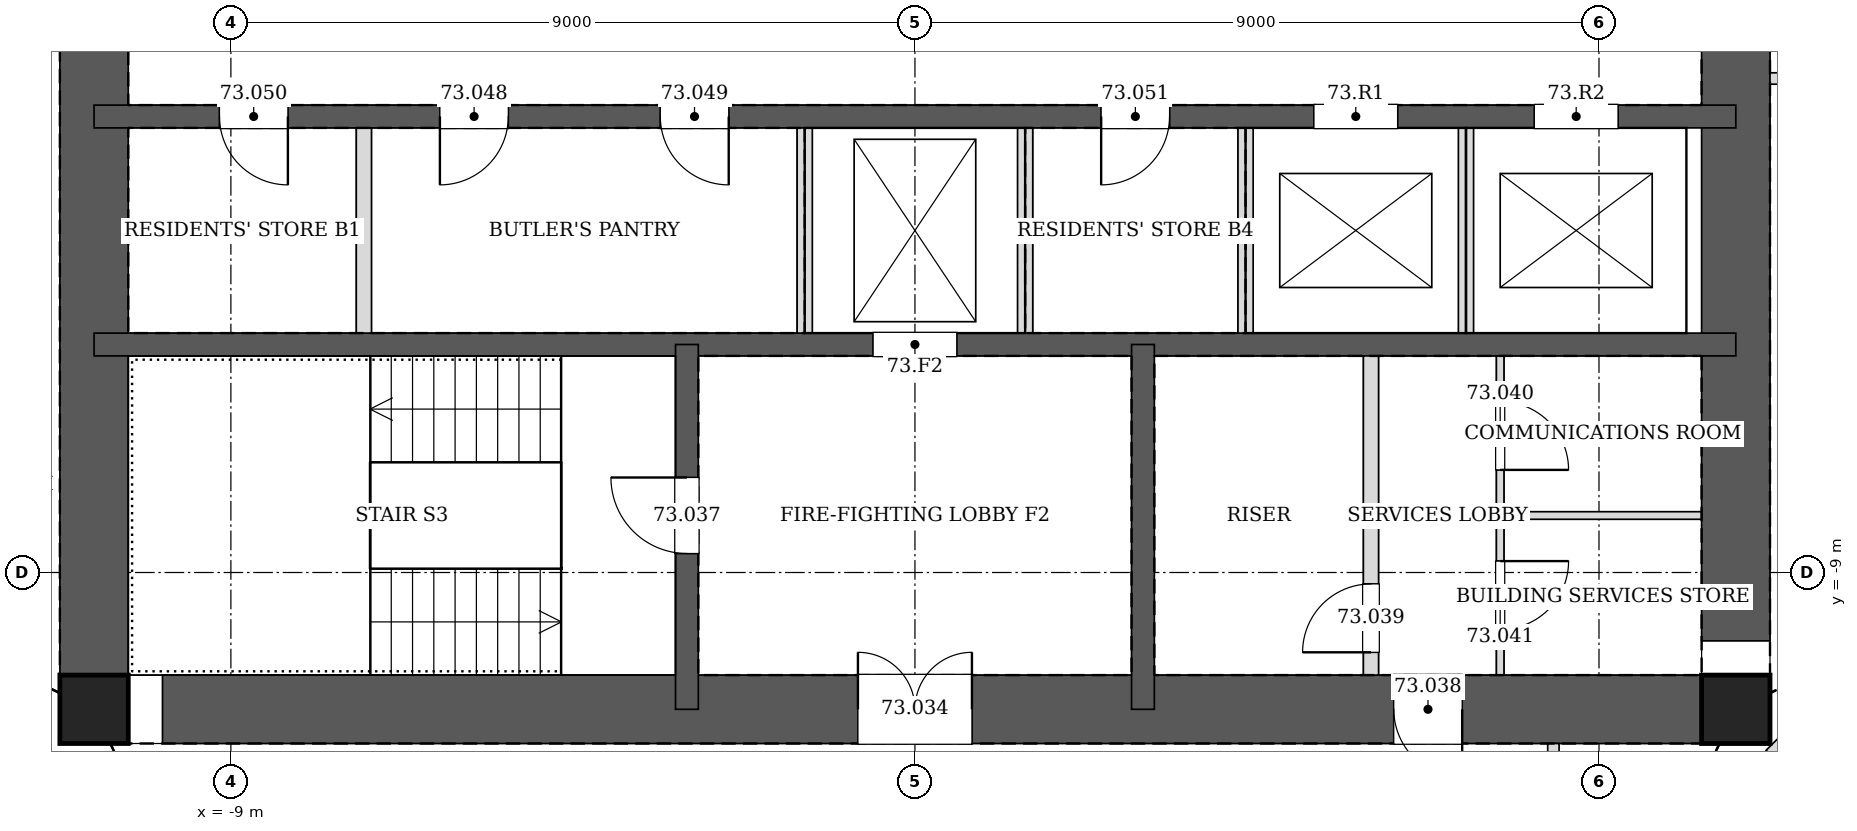
"""IFC4 building model, lengths in metres.
Left out: names, types, materials, properties, quantities, classifications, styles, units other than length and angle.
Written with IfcOpenShell. Run it as: python <this file> out.ifc"""

import sys

from ifc_helpers import new_model, si_unit, direction, frame, frame_2d, origin, origin_2d, place, context, subcontext, project, spatial, rectangle, hollow_rectangle, extrude, element, fill, save


model = new_model("IFC4")
c1 = context("Model", 3, precision=1e-05, world=origin(), true_north=direction((0.0, 1.0)))
c2 = subcontext(c1, "Body", "Model", "MODEL_VIEW")
j1 = project(units=[si_unit("LENGTHUNIT", "METRE"), si_unit("PLANEANGLEUNIT", "RADIAN")], contexts=[c1])
p1 = place(None, origin())
s1 = spatial("IfcSite", under=j1, at=p1, CompositionType="ELEMENT")
p2 = place(p1, origin())
s2 = spatial("IfcBuilding", under=s1, at=p2, CompositionType="ELEMENT")
p3 = place(p2, frame((0.0, 0.0, 298.0)))
s3 = spatial("IfcBuildingStorey", under=s2, at=p3, CompositionType="ELEMENT", Elevation=298.0)
for number, where, z_axis, x_axis in (
    (1, (-10.8, -10.8, 0.0), (0.0, 0.0, 1.0), (1.0, 0.0, 0.0)),
    (2, (10.8, -10.8, 0.0), (0.0, 0.0, 1.0), (1.0, 0.0, 0.0)),
):
    element("IfcColumn", number, at=place(p3, frame(where, z_axis=z_axis, x_axis=x_axis)), inside=s3, PredefinedType="COLUMN", context=c2, shape_type="SweptSolid", body=[
        extrude(hollow_rectangle(XDim=0.9, YDim=0.9, WallThickness=0.04, at=origin_2d()), origin(), (0.0, 0.0, 1.0), 3.4),
    ])
p4 = place(p3, frame((-10.8, -10.8, 0.0), z_axis=(0.0, 0.0, 1.0), x_axis=(1.0, 0.0, 0.0)))
e3 = element("IfcWall", 3, at=p4, inside=s3, PredefinedType="SOLIDWALL", context=c2, shape_type="SweptSolid", body=[
    extrude(rectangle(XDim=21.6, YDim=0.9, at=frame_2d((10.8, 0.0))), origin(), (0.0, 0.0, 1.0), 3.4),
])
p5 = place(p4, frame((10.05, 0.0, 0.0)))
e4 = element("IfcOpeningElement", 4, at=p5, cuts=e3, PredefinedType="OPENING", context=c2, shape_type="SweptSolid", body=[
    extrude(rectangle(XDim=1.5, YDim=2.1, at=frame_2d((0.75, 1.05))), frame((0.0, 0.46, 0.0), z_axis=(0.0, -1.0, 0.0), x_axis=(1.0, 0.0, 0.0)), (0.0, 0.0, 1.0), 0.92),
])
p6 = place(p4, frame((17.1, 0.0, 0.0)))
e5 = element("IfcOpeningElement", 5, at=p6, cuts=e3, PredefinedType="OPENING", context=c2, shape_type="SweptSolid", body=[
    extrude(rectangle(XDim=0.9, YDim=2.1, at=frame_2d((0.45, 1.05))), frame((0.0, 0.46, 0.0), z_axis=(0.0, -1.0, 0.0), x_axis=(1.0, 0.0, 0.0)), (0.0, 0.0, 1.0), 0.92),
])
p7 = place(p3, frame((10.8, -10.8, 0.0), z_axis=(0.0, 0.0, 1.0), x_axis=(0.0, 1.0, 0.0)))
e6 = element("IfcWall", 6, at=p7, inside=s3, PredefinedType="SOLIDWALL", context=c2, shape_type="SweptSolid", body=[
    extrude(rectangle(XDim=21.6, YDim=0.9, at=frame_2d((10.8, 0.0))), origin(), (0.0, 0.0, 1.0), 3.4),
])
p8 = place(p7, frame((11.7, 0.0, 0.0)))
e7 = element("IfcOpeningElement", 7, at=p8, cuts=e6, PredefinedType="OPENING", context=c2, shape_type="SweptSolid", body=[
    extrude(rectangle(XDim=1.2, YDim=2.1, at=frame_2d((0.6, 1.05))), frame((0.0, 0.46, 0.0), z_axis=(0.0, -1.0, 0.0), x_axis=(1.0, 0.0, 0.0)), (0.0, 0.0, 1.0), 0.92),
])
p9 = place(p7, frame((8.7, 0.0, 0.0)))
e8 = element("IfcOpeningElement", 8, at=p9, cuts=e6, PredefinedType="OPENING", context=c2, shape_type="SweptSolid", body=[
    extrude(rectangle(XDim=1.2, YDim=2.1, at=frame_2d((0.6, 1.05))), frame((0.0, 0.46, 0.0), z_axis=(0.0, -1.0, 0.0), x_axis=(1.0, 0.0, 0.0)), (0.0, 0.0, 1.0), 0.92),
])
p10 = place(p3, frame((-10.8, 10.8, 0.0), z_axis=(0.0, 0.0, 1.0), x_axis=(0.0, -1.0, 0.0)))
e9 = element("IfcWall", 9, at=p10, inside=s3, PredefinedType="SOLIDWALL", context=c2, shape_type="SweptSolid", body=[
    extrude(rectangle(XDim=21.6, YDim=0.9, at=frame_2d((10.8, 0.0))), origin(), (0.0, 0.0, 1.0), 3.4),
])
p11 = place(p10, frame((8.7, 0.0, 0.0)))
e10 = element("IfcOpeningElement", 10, at=p11, cuts=e9, PredefinedType="OPENING", context=c2, shape_type="SweptSolid", body=[
    extrude(rectangle(XDim=1.2, YDim=2.1, at=frame_2d((0.6, 1.05))), frame((0.0, 0.46, 0.0), z_axis=(0.0, -1.0, 0.0), x_axis=(1.0, 0.0, 0.0)), (0.0, 0.0, 1.0), 0.92),
])
p12 = place(p10, frame((11.7, 0.0, 0.0)))
e11 = element("IfcOpeningElement", 11, at=p12, cuts=e9, PredefinedType="OPENING", context=c2, shape_type="SweptSolid", body=[
    extrude(rectangle(XDim=1.2, YDim=2.1, at=frame_2d((0.6, 1.05))), frame((0.0, 0.46, 0.0), z_axis=(0.0, -1.0, 0.0), x_axis=(1.0, 0.0, 0.0)), (0.0, 0.0, 1.0), 0.92),
])
p13 = place(p3, frame((-10.8, -3.0, 0.0), z_axis=(0.0, 0.0, 1.0), x_axis=(1.0, 0.0, 0.0)))
e12 = element("IfcWall", 12, at=p13, inside=s3, PredefinedType="SOLIDWALL", context=c2, shape_type="SweptSolid", body=[
    extrude(rectangle(XDim=21.6, YDim=0.3, at=frame_2d((10.8, 0.0))), origin(), (0.0, 0.0, 1.0), 3.4),
])
p14 = place(p13, frame((4.55, 0.0, 0.0)))
e13 = element("IfcOpeningElement", 13, at=p14, cuts=e12, PredefinedType="OPENING", context=c2, shape_type="SweptSolid", body=[
    extrude(rectangle(XDim=0.9, YDim=2.1, at=frame_2d((0.45, 1.05))), frame((0.0, 0.16, 0.0), z_axis=(0.0, -1.0, 0.0), x_axis=(1.0, 0.0, 0.0)), (0.0, 0.0, 1.0), 0.32),
])
p15 = place(p13, frame((7.45, 0.0, 0.0)))
e14 = element("IfcOpeningElement", 14, at=p15, cuts=e12, PredefinedType="OPENING", context=c2, shape_type="SweptSolid", body=[
    extrude(rectangle(XDim=0.9, YDim=2.1, at=frame_2d((0.45, 1.05))), frame((0.0, 0.16, 0.0), z_axis=(0.0, -1.0, 0.0), x_axis=(1.0, 0.0, 0.0)), (0.0, 0.0, 1.0), 0.32),
])
p16 = place(p13, frame((1.65, 0.0, 0.0)))
e15 = element("IfcOpeningElement", 15, at=p16, cuts=e12, PredefinedType="OPENING", context=c2, shape_type="SweptSolid", body=[
    extrude(rectangle(XDim=0.9, YDim=2.1, at=frame_2d((0.45, 1.05))), frame((0.0, 0.16, 0.0), z_axis=(0.0, -1.0, 0.0), x_axis=(1.0, 0.0, 0.0)), (0.0, 0.0, 1.0), 0.32),
])
p17 = place(p13, frame((13.25, 0.0, 0.0)))
e16 = element("IfcOpeningElement", 16, at=p17, cuts=e12, PredefinedType="OPENING", context=c2, shape_type="SweptSolid", body=[
    extrude(rectangle(XDim=0.9, YDim=2.1, at=frame_2d((0.45, 1.05))), frame((0.0, 0.16, 0.0), z_axis=(0.0, -1.0, 0.0), x_axis=(1.0, 0.0, 0.0)), (0.0, 0.0, 1.0), 0.32),
])
p18 = place(p13, frame((16.05, 0.0, 0.0)))
e17 = element("IfcOpeningElement", 17, at=p18, cuts=e12, PredefinedType="OPENING", context=c2, shape_type="SweptSolid", body=[
    extrude(rectangle(XDim=1.1, YDim=2.1, at=frame_2d((0.55, 1.05))), frame((0.0, 0.16, 0.0), z_axis=(0.0, -1.0, 0.0), x_axis=(1.0, 0.0, 0.0)), (0.0, 0.0, 1.0), 0.32),
])
p19 = place(p13, frame((18.95, 0.0, 0.0)))
e18 = element("IfcOpeningElement", 18, at=p19, cuts=e12, PredefinedType="OPENING", context=c2, shape_type="SweptSolid", body=[
    extrude(rectangle(XDim=1.1, YDim=2.1, at=frame_2d((0.55, 1.05))), frame((0.0, 0.16, 0.0), z_axis=(0.0, -1.0, 0.0), x_axis=(1.0, 0.0, 0.0)), (0.0, 0.0, 1.0), 0.32),
])
p20 = place(p3, frame((-10.8, -6.0, 0.0), z_axis=(0.0, 0.0, 1.0), x_axis=(1.0, 0.0, 0.0)))
e19 = element("IfcWall", 19, at=p20, inside=s3, PredefinedType="SOLIDWALL", context=c2, shape_type="SweptSolid", body=[
    extrude(rectangle(XDim=21.6, YDim=0.3, at=frame_2d((10.8, 0.0))), origin(), (0.0, 0.0, 1.0), 3.4),
])
p21 = place(p20, frame((10.25, 0.0, 0.0)))
e20 = element("IfcOpeningElement", 20, at=p21, cuts=e19, PredefinedType="OPENING", context=c2, shape_type="SweptSolid", body=[
    extrude(rectangle(XDim=1.1, YDim=2.1, at=frame_2d((0.55, 1.05))), frame((0.0, 0.16, 0.0), z_axis=(0.0, -1.0, 0.0), x_axis=(1.0, 0.0, 0.0)), (0.0, 0.0, 1.0), 0.32),
])
p22 = place(p3, frame((-3.0, -6.0, 0.0), z_axis=(0.0, 0.0, 1.0), x_axis=(0.0, -1.0, 0.0)))
e21 = element("IfcWall", 21, at=p22, inside=s3, PredefinedType="SOLIDWALL", context=c2, shape_type="SweptSolid", body=[
    extrude(rectangle(XDim=4.8, YDim=0.3, at=frame_2d((2.4, 0.0))), origin(), (0.0, 0.0, 1.0), 3.4),
])
p23 = place(p22, frame((1.75, 0.0, 0.0)))
e22 = element("IfcOpeningElement", 22, at=p23, cuts=e21, PredefinedType="OPENING", context=c2, shape_type="SweptSolid", body=[
    extrude(rectangle(XDim=1.0, YDim=2.1, at=frame_2d((0.5, 1.05))), frame((0.0, 0.16, 0.0), z_axis=(0.0, -1.0, 0.0), x_axis=(1.0, 0.0, 0.0)), (0.0, 0.0, 1.0), 0.32),
])
p24 = place(p3, frame((3.0, -6.0, 0.0), z_axis=(0.0, 0.0, 1.0), x_axis=(0.0, -1.0, 0.0)))
e23 = element("IfcWall", 23, at=p24, inside=s3, PredefinedType="SOLIDWALL", context=c2, shape_type="SweptSolid", body=[
    extrude(rectangle(XDim=4.8, YDim=0.3, at=frame_2d((2.4, 0.0))), origin(), (0.0, 0.0, 1.0), 3.4),
])
for number, where, z_axis, x_axis in (
    (24, (11.25, -2.5, 0.0), (0.0, 0.0, 1.0), (1.0, 0.0, 0.0)),
    (25, (8.4, -12.9, 0.0), (0.0, 0.0, 1.0), (0.0, 1.0, 0.0)),
):
    element("IfcWall", number, at=place(p3, frame(where, z_axis=z_axis, x_axis=x_axis)), inside=s3, PredefinedType="PARTITIONING", context=c2, shape_type="SweptSolid", body=[
        extrude(rectangle(XDim=1.65, YDim=0.15, at=frame_2d((0.825, 0.0))), origin(), (0.0, 0.0, 1.0), 3.2),
    ])
p25 = place(p3, frame((11.269, -11.269, 0.0), z_axis=(0.0, 0.0, 1.0), x_axis=(0.707106781187, -0.707106781187, 0.0)))
e26 = element("IfcWall", 26, at=p25, inside=s3, PredefinedType="PARTITIONING", context=c2, shape_type="SweptSolid", body=[
    extrude(rectangle(XDim=2.508, YDim=0.2, at=frame_2d((1.254, 0.0))), origin(), (0.0, 0.0, 1.0), 2.591),
])
for number, where, z_axis, x_axis in (
    (27, (-7.25, -5.85, 0.0), (0.0, 0.0, 1.0), (0.0, 1.0, 0.0)),
    (28, (-1.45, -5.85, 0.0), (0.0, 0.0, 1.0), (0.0, 1.0, 0.0)),
    (29, (1.45, -5.85, 0.0), (0.0, 0.0, 1.0), (0.0, 1.0, 0.0)),
    (30, (4.35, -5.85, 0.0), (0.0, 0.0, 1.0), (0.0, 1.0, 0.0)),
):
    element("IfcWall", number, at=place(p3, frame(where, z_axis=z_axis, x_axis=x_axis)), inside=s3, PredefinedType="PARTITIONING", context=c2, shape_type="SweptSolid", body=[
        extrude(rectangle(XDim=2.7, YDim=0.2, at=frame_2d((1.35, 0.0))), origin(), (0.0, 0.0, 1.0), 3.2),
    ])
p26 = place(p3, frame((7.25, -5.85, 0.0), z_axis=(0.0, 0.0, 1.0), x_axis=(0.0, 1.0, 0.0)))
e31 = element("IfcWall", 31, at=p26, inside=s3, PredefinedType="PARTITIONING", context=c2, shape_type="SweptSolid", body=[
    extrude(rectangle(XDim=2.7, YDim=0.2, at=frame_2d((1.35, 0.0))), origin(), (0.0, 0.0, 1.0), 3.4),
])
p27 = place(p3, frame((6.0, -10.35, 0.0), z_axis=(0.0, 0.0, 1.0), x_axis=(0.0, 1.0, 0.0)))
e32 = element("IfcWall", 32, at=p27, inside=s3, PredefinedType="PARTITIONING", context=c2, shape_type="SweptSolid", body=[
    extrude(rectangle(XDim=4.2, YDim=0.2, at=frame_2d((2.1, 0.0))), origin(), (0.0, 0.0, 1.0), 3.2),
])
p28 = place(p27, frame((0.3, 0.0, 0.0)))
e33 = element("IfcOpeningElement", 33, at=p28, cuts=e32, PredefinedType="OPENING", context=c2, shape_type="SweptSolid", body=[
    extrude(rectangle(XDim=0.9, YDim=2.1, at=frame_2d((0.45, 1.05))), frame((0.0, 0.11, 0.0), z_axis=(0.0, -1.0, 0.0), x_axis=(1.0, 0.0, 0.0)), (0.0, 0.0, 1.0), 0.22),
])
p29 = place(p3, frame((7.7, -10.35, 0.0), z_axis=(0.0, 0.0, 1.0), x_axis=(0.0, 1.0, 0.0)))
e34 = element("IfcWall", 34, at=p29, inside=s3, PredefinedType="PARTITIONING", context=c2, shape_type="SweptSolid", body=[
    extrude(rectangle(XDim=4.2, YDim=0.1, at=frame_2d((2.1, 0.0))), origin(), (0.0, 0.0, 1.0), 3.2),
])
p30 = place(p29, frame((2.7, 0.0, 0.0)))
e35 = element("IfcOpeningElement", 35, at=p30, cuts=e34, PredefinedType="OPENING", context=c2, shape_type="SweptSolid", body=[
    extrude(rectangle(XDim=0.9, YDim=2.1, at=frame_2d((0.45, 1.05))), frame((0.0, 0.06, 0.0), z_axis=(0.0, -1.0, 0.0), x_axis=(1.0, 0.0, 0.0)), (0.0, 0.0, 1.0), 0.12),
])
p31 = place(p29, frame((0.6, 0.0, 0.0)))
e36 = element("IfcOpeningElement", 36, at=p31, cuts=e34, PredefinedType="OPENING", context=c2, shape_type="SweptSolid", body=[
    extrude(rectangle(XDim=0.9, YDim=2.1, at=frame_2d((0.45, 1.05))), frame((0.0, 0.06, 0.0), z_axis=(0.0, -1.0, 0.0), x_axis=(1.0, 0.0, 0.0)), (0.0, 0.0, 1.0), 0.12),
])
p32 = place(p3, frame((7.7, -8.25, 0.0), z_axis=(0.0, 0.0, 1.0), x_axis=(1.0, 0.0, 0.0)))
e37 = element("IfcWall", 37, at=p32, inside=s3, PredefinedType="PARTITIONING", context=c2, shape_type="SweptSolid", body=[
    extrude(rectangle(XDim=2.65, YDim=0.1, at=frame_2d((1.325, 0.0))), origin(), (0.0, 0.0, 1.0), 3.2),
])
p33 = place(p5, origin())
e38 = element("IfcDoor", 38, at=p33, inside=s3, OperationType="DOUBLE_DOOR_SINGLE_SWING", PredefinedType="DOOR", context=c2, shape_type="SweptSolid", body=[
    extrude(rectangle(XDim=1.5, YDim=2.1, at=frame_2d((0.75, 1.05))), frame((0.0, 0.025, 0.0), z_axis=(0.0, -1.0, 0.0), x_axis=(1.0, 0.0, 0.0)), (0.0, 0.0, 1.0), 0.05),
])
fill(e4, e38)
p34 = place(p23, frame((1.0, 0.0, 0.0), z_axis=(0.0, 0.0, 1.0), x_axis=(-1.0, 0.0, 0.0)))
e39 = element("IfcDoor", 39, at=p34, inside=s3, OperationType="SINGLE_SWING_RIGHT", PredefinedType="DOOR", context=c2, shape_type="SweptSolid", body=[
    extrude(rectangle(XDim=1.0, YDim=2.1, at=frame_2d((0.5, 1.05))), frame((0.0, 0.025, 0.0), z_axis=(0.0, -1.0, 0.0), x_axis=(1.0, 0.0, 0.0)), (0.0, 0.0, 1.0), 0.05),
])
fill(e22, e39)
p35 = place(p6, frame((0.9, 0.0, 0.0), z_axis=(0.0, 0.0, 1.0), x_axis=(-1.0, 0.0, 0.0)))
e40 = element("IfcDoor", 40, at=p35, inside=s3, OperationType="SINGLE_SWING_LEFT", PredefinedType="DOOR", context=c2, shape_type="SweptSolid", body=[
    extrude(rectangle(XDim=0.9, YDim=2.1, at=frame_2d((0.45, 1.05))), frame((0.0, 0.025, 0.0), z_axis=(0.0, -1.0, 0.0), x_axis=(1.0, 0.0, 0.0)), (0.0, 0.0, 1.0), 0.05),
])
fill(e5, e40)
p36 = place(p28, origin())
e41 = element("IfcDoor", 41, at=p36, inside=s3, OperationType="SINGLE_SWING_LEFT", PredefinedType="DOOR", context=c2, shape_type="SweptSolid", body=[
    extrude(rectangle(XDim=0.9, YDim=2.1, at=frame_2d((0.45, 1.05))), frame((0.0, 0.025, 0.0), z_axis=(0.0, -1.0, 0.0), x_axis=(1.0, 0.0, 0.0)), (0.0, 0.0, 1.0), 0.05),
])
fill(e33, e41)
p37 = place(p30, frame((0.9, 0.0, 0.0), z_axis=(0.0, 0.0, 1.0), x_axis=(-1.0, 0.0, 0.0)))
e42 = element("IfcDoor", 42, at=p37, inside=s3, OperationType="SINGLE_SWING_RIGHT", PredefinedType="DOOR", context=c2, shape_type="SweptSolid", body=[
    extrude(rectangle(XDim=0.9, YDim=2.1, at=frame_2d((0.45, 1.05))), frame((0.0, 0.025, 0.0), z_axis=(0.0, -1.0, 0.0), x_axis=(1.0, 0.0, 0.0)), (0.0, 0.0, 1.0), 0.05),
])
fill(e35, e42)
p38 = place(p31, frame((0.9, 0.0, 0.0), z_axis=(0.0, 0.0, 1.0), x_axis=(-1.0, 0.0, 0.0)))
e43 = element("IfcDoor", 43, at=p38, inside=s3, OperationType="SINGLE_SWING_LEFT", PredefinedType="DOOR", context=c2, shape_type="SweptSolid", body=[
    extrude(rectangle(XDim=0.9, YDim=2.1, at=frame_2d((0.45, 1.05))), frame((0.0, 0.025, 0.0), z_axis=(0.0, -1.0, 0.0), x_axis=(1.0, 0.0, 0.0)), (0.0, 0.0, 1.0), 0.05),
])
fill(e36, e43)
p39 = place(p14, frame((0.9, 0.0, 0.0), z_axis=(0.0, 0.0, 1.0), x_axis=(-1.0, 0.0, 0.0)))
e44 = element("IfcDoor", 44, at=p39, inside=s3, OperationType="SINGLE_SWING_RIGHT", PredefinedType="DOOR", context=c2, shape_type="SweptSolid", body=[
    extrude(rectangle(XDim=0.9, YDim=2.1, at=frame_2d((0.45, 1.05))), frame((0.0, 0.025, 0.0), z_axis=(0.0, -1.0, 0.0), x_axis=(1.0, 0.0, 0.0)), (0.0, 0.0, 1.0), 0.05),
])
fill(e13, e44)
p40 = place(p15, frame((0.9, 0.0, 0.0), z_axis=(0.0, 0.0, 1.0), x_axis=(-1.0, 0.0, 0.0)))
e45 = element("IfcDoor", 45, at=p40, inside=s3, OperationType="SINGLE_SWING_LEFT", PredefinedType="DOOR", context=c2, shape_type="SweptSolid", body=[
    extrude(rectangle(XDim=0.9, YDim=2.1, at=frame_2d((0.45, 1.05))), frame((0.0, 0.025, 0.0), z_axis=(0.0, -1.0, 0.0), x_axis=(1.0, 0.0, 0.0)), (0.0, 0.0, 1.0), 0.05),
])
fill(e14, e45)
p41 = place(p16, frame((0.9, 0.0, 0.0), z_axis=(0.0, 0.0, 1.0), x_axis=(-1.0, 0.0, 0.0)))
e46 = element("IfcDoor", 46, at=p41, inside=s3, OperationType="SINGLE_SWING_LEFT", PredefinedType="DOOR", context=c2, shape_type="SweptSolid", body=[
    extrude(rectangle(XDim=0.9, YDim=2.1, at=frame_2d((0.45, 1.05))), frame((0.0, 0.025, 0.0), z_axis=(0.0, -1.0, 0.0), x_axis=(1.0, 0.0, 0.0)), (0.0, 0.0, 1.0), 0.05),
])
fill(e15, e46)
p42 = place(p17, frame((0.9, 0.0, 0.0), z_axis=(0.0, 0.0, 1.0), x_axis=(-1.0, 0.0, 0.0)))
e47 = element("IfcDoor", 47, at=p42, inside=s3, OperationType="SINGLE_SWING_RIGHT", PredefinedType="DOOR", context=c2, shape_type="SweptSolid", body=[
    extrude(rectangle(XDim=0.9, YDim=2.1, at=frame_2d((0.45, 1.05))), frame((0.0, 0.025, 0.0), z_axis=(0.0, -1.0, 0.0), x_axis=(1.0, 0.0, 0.0)), (0.0, 0.0, 1.0), 0.05),
])
fill(e16, e47)
p43 = place(p21, origin())
e48 = element("IfcDoor", 48, at=p43, inside=s3, OperationType="DOUBLE_DOOR_SLIDING", PredefinedType="DOOR", context=c2, shape_type="SweptSolid", body=[
    extrude(rectangle(XDim=1.1, YDim=2.1, at=frame_2d((0.55, 1.05))), frame((0.0, 0.025, 0.0), z_axis=(0.0, -1.0, 0.0), x_axis=(1.0, 0.0, 0.0)), (0.0, 0.0, 1.0), 0.05),
])
fill(e20, e48)
p44 = place(p18, origin())
e49 = element("IfcDoor", 49, at=p44, inside=s3, OperationType="DOUBLE_DOOR_SLIDING", PredefinedType="DOOR", context=c2, shape_type="SweptSolid", body=[
    extrude(rectangle(XDim=1.1, YDim=2.1, at=frame_2d((0.55, 1.05))), frame((0.0, 0.025, 0.0), z_axis=(0.0, -1.0, 0.0), x_axis=(1.0, 0.0, 0.0)), (0.0, 0.0, 1.0), 0.05),
])
fill(e17, e49)
p45 = place(p19, origin())
e50 = element("IfcDoor", 50, at=p45, inside=s3, OperationType="DOUBLE_DOOR_SLIDING", PredefinedType="DOOR", context=c2, shape_type="SweptSolid", body=[
    extrude(rectangle(XDim=1.1, YDim=2.1, at=frame_2d((0.55, 1.05))), frame((0.0, 0.025, 0.0), z_axis=(0.0, -1.0, 0.0), x_axis=(1.0, 0.0, 0.0)), (0.0, 0.0, 1.0), 0.05),
])
fill(e18, e50)
save(model, sys.argv[1])
